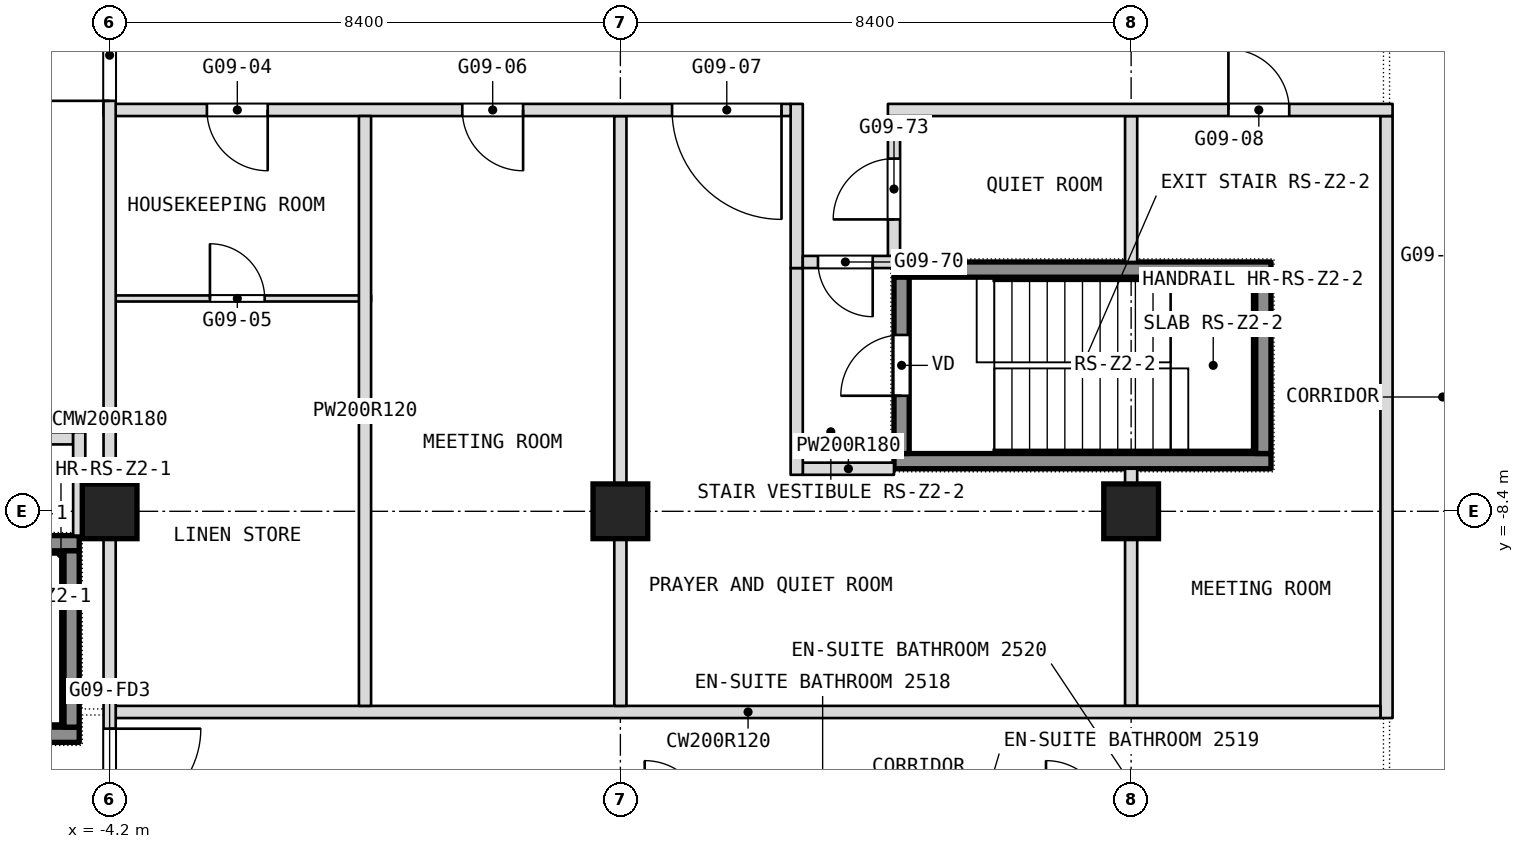
"""IFC4 building model, lengths in metres.
Left out: names, types, materials, properties, quantities, classifications, styles, units other than length and angle.
Written with IfcOpenShell. Run it as: python <this file> out.ifc"""

import sys

from ifc_helpers import new_model, si_unit, direction, frame, frame_2d, origin, origin_2d, place, context, subcontext, project, spatial, rectangle, extrude, element, fill, save


model = new_model("IFC4")
c1 = context("Model", 3, precision=1e-05, world=origin(), true_north=direction((0.0, 1.0)))
c2 = subcontext(c1, "Body", "Model", "MODEL_VIEW")
j1 = project(units=[si_unit("LENGTHUNIT", "METRE"), si_unit("PLANEANGLEUNIT", "RADIAN")], contexts=[c1])
p1 = place(None, origin())
s1 = spatial("IfcSite", under=j1, at=p1, CompositionType="ELEMENT")
p2 = place(p1, origin())
s2 = spatial("IfcBuilding", under=s1, at=p2, CompositionType="ELEMENT")
p3 = place(p2, frame((0.0, 0.0, 115.7)))
s3 = spatial("IfcBuildingStorey", under=s2, at=p3, CompositionType="ELEMENT", Elevation=115.7)
for number, where, z_axis, x_axis in (
    (1, (-4.2, -8.4, 0.0), (0.0, 0.0, 1.0), (1.0, 0.0, 0.0)),
    (2, (4.2, -8.4, 0.0), (0.0, 0.0, 1.0), (1.0, 0.0, 0.0)),
    (3, (12.6, -8.4, 0.0), (0.0, 0.0, 1.0), (1.0, 0.0, 0.0)),
):
    element("IfcColumn", number, at=place(p3, frame(where, z_axis=z_axis, x_axis=x_axis)), inside=s3, PredefinedType="COLUMN", context=c2, shape_type="SweptSolid", body=[
        extrude(rectangle(XDim=0.9, YDim=0.9, at=origin_2d()), origin(), (0.0, 0.0, 1.0), 3.6),
    ])
p4 = place(p3, frame((16.8, -11.8, 0.0), z_axis=(0.0, 0.0, 1.0), x_axis=(0.0, 1.0, 0.0)))
e4 = element("IfcWall", 4, at=p4, inside=s3, PredefinedType="PARTITIONING", context=c2, shape_type="SweptSolid", body=[
    extrude(rectangle(XDim=9.9, YDim=0.2, at=frame_2d((4.95, 0.0))), origin(), (0.0, 0.0, 1.0), 3.34),
])
p5 = place(p3, frame((12.6, -11.6, 0.0), z_axis=(0.0, 0.0, 1.0), x_axis=(0.0, 1.0, 0.0)))
e5 = element("IfcWall", 5, at=p5, inside=s3, PredefinedType="PARTITIONING", context=c2, shape_type="SweptSolid", body=[
    extrude(rectangle(XDim=3.9, YDim=0.2, at=frame_2d((1.95, 0.0))), origin(), (0.0, 0.0, 1.0), 3.34),
])
p6 = place(p3, frame((12.6, -4.3, 0.0), z_axis=(0.0, 0.0, 1.0), x_axis=(0.0, 1.0, 0.0)))
e6 = element("IfcWall", 6, at=p6, inside=s3, PredefinedType="PARTITIONING", context=c2, shape_type="SweptSolid", body=[
    extrude(rectangle(XDim=2.4, YDim=0.2, at=frame_2d((1.2, 0.0))), origin(), (0.0, 0.0, 1.0), 3.34),
])
p7 = place(p3, frame((-4.1, -11.7, 0.0), z_axis=(0.0, 0.0, 1.0), x_axis=(1.0, 0.0, 0.0)))
e7 = element("IfcWall", 7, at=p7, inside=s3, PredefinedType="PARTITIONING", context=c2, shape_type="SweptSolid", body=[
    extrude(rectangle(XDim=20.8, YDim=0.2, at=frame_2d((10.4, 0.0))), origin(), (0.0, 0.0, 1.0), 3.34),
])
p8 = place(p3, frame((8.7, -4.3, 0.0), z_axis=(0.0, 0.0, 1.0), x_axis=(0.0, 1.0, 0.0)))
e8 = element("IfcWall", 8, at=p8, inside=s3, PredefinedType="PARTITIONING", context=c2, shape_type="SweptSolid", body=[
    extrude(rectangle(XDim=2.4, YDim=0.2, at=frame_2d((1.2, 0.0))), origin(), (0.0, 0.0, 1.0), 3.34),
])
p9 = place(p8, frame((0.7, 0.0, 0.0)))
e9 = element("IfcOpeningElement", 9, at=p9, cuts=e8, PredefinedType="OPENING", context=c2, shape_type="SweptSolid", body=[
    extrude(rectangle(XDim=1.0, YDim=2.1, at=frame_2d((0.5, 1.05))), frame((0.0, 0.1, 0.0), z_axis=(0.0, -1.0, 0.0), x_axis=(1.0, 0.0, 0.0)), (0.0, 0.0, 1.0), 0.2),
])
p10 = place(p3, frame((7.2, -7.7, 0.0), z_axis=(0.0, 0.0, 1.0), x_axis=(1.0, 0.0, 0.0)))
e10 = element("IfcWall", 10, at=p10, inside=s3, PredefinedType="PARTITIONING", context=c2, shape_type="SweptSolid", body=[
    extrude(rectangle(XDim=1.5, YDim=0.2, at=frame_2d((0.75, 0.0))), origin(), (0.0, 0.0, 1.0), 3.34),
])
p11 = place(p3, frame((-8.5, -7.2, 0.0), z_axis=(0.0, 0.0, 1.0), x_axis=(1.0, 0.0, 0.0)))
e11 = element("IfcWall", 11, at=p11, inside=s3, PredefinedType="PARTITIONING", context=c2, shape_type="SweptSolid", body=[
    extrude(rectangle(XDim=3.7, YDim=0.2, at=frame_2d((1.85, 0.0))), origin(), (0.0, 0.0, 1.0), 3.34),
])
p12 = place(p11, frame((0.25, 0.0, 0.0)))
e12 = element("IfcOpeningElement", 12, at=p12, cuts=e11, PredefinedType="OPENING", context=c2, shape_type="SweptSolid", body=[
    extrude(rectangle(XDim=0.9, YDim=2.1, at=frame_2d((0.45, 1.05))), frame((0.0, 0.1, 0.0), z_axis=(0.0, -1.0, 0.0), x_axis=(1.0, 0.0, 0.0)), (0.0, 0.0, 1.0), 0.2),
])
p13 = place(p3, frame((7.1, -7.8, 0.0), z_axis=(0.0, 0.0, 1.0), x_axis=(0.0, 1.0, 0.0)))
e13 = element("IfcWall", 13, at=p13, inside=s3, PredefinedType="PARTITIONING", context=c2, shape_type="SweptSolid", body=[
    extrude(rectangle(XDim=3.4, YDim=0.2, at=frame_2d((1.7, 0.0))), origin(), (0.0, 0.0, 1.0), 3.34),
])
p14 = place(p3, frame((7.1, -4.4, 0.0), z_axis=(0.0, 0.0, 1.0), x_axis=(0.0, 1.0, 0.0)))
e14 = element("IfcWall", 14, at=p14, inside=s3, PredefinedType="PARTITIONING", context=c2, shape_type="SweptSolid", body=[
    extrude(rectangle(XDim=2.7, YDim=0.2, at=frame_2d((1.35, 0.0))), origin(), (0.0, 0.0, 1.0), 3.34),
])
p15 = place(p3, frame((-4.1, -4.9, 0.0), z_axis=(0.0, 0.0, 1.0), x_axis=(1.0, 0.0, 0.0)))
e15 = element("IfcWall", 15, at=p15, inside=s3, PredefinedType="PARTITIONING", context=c2, shape_type="SweptSolid", body=[
    extrude(rectangle(XDim=4.2, YDim=0.1, at=frame_2d((2.1, 0.0))), origin(), (0.0, 0.0, 1.0), 3.34),
])
p16 = place(p15, frame((1.55, 0.0, 0.0)))
e16 = element("IfcOpeningElement", 16, at=p16, cuts=e15, PredefinedType="OPENING", context=c2, shape_type="SweptSolid", body=[
    extrude(rectangle(XDim=0.9, YDim=2.1, at=frame_2d((0.45, 1.05))), frame((0.0, 0.05, 0.0), z_axis=(0.0, -1.0, 0.0), x_axis=(1.0, 0.0, 0.0)), (0.0, 0.0, 1.0), 0.1),
])
p17 = place(p3, frame((7.2, -4.3, 0.0), z_axis=(0.0, 0.0, 1.0), x_axis=(1.0, 0.0, 0.0)))
e17 = element("IfcWall", 17, at=p17, inside=s3, PredefinedType="PARTITIONING", context=c2, shape_type="SweptSolid", body=[
    extrude(rectangle(XDim=1.5, YDim=0.2, at=frame_2d((0.75, 0.0))), origin(), (0.0, 0.0, 1.0), 3.34),
])
p18 = place(p17, frame((0.25, 0.0, 0.0)))
e18 = element("IfcOpeningElement", 18, at=p18, cuts=e17, PredefinedType="OPENING", context=c2, shape_type="SweptSolid", body=[
    extrude(rectangle(XDim=0.9, YDim=2.1, at=frame_2d((0.45, 1.05))), frame((0.0, 0.1, 0.0), z_axis=(0.0, -1.0, 0.0), x_axis=(1.0, 0.0, 0.0)), (0.0, 0.0, 1.0), 0.2),
])
p19 = place(p3, frame((4.2, -11.6, 0.0), z_axis=(0.0, 0.0, 1.0), x_axis=(0.0, 1.0, 0.0)))
e19 = element("IfcWall", 19, at=p19, inside=s3, PredefinedType="PARTITIONING", context=c2, shape_type="SweptSolid", body=[
    extrude(rectangle(XDim=9.7, YDim=0.2, at=frame_2d((4.85, 0.0))), origin(), (0.0, 0.0, 1.0), 3.34),
])
p20 = place(p3, frame((-4.3, -1.8, 0.0), z_axis=(0.0, 0.0, 1.0), x_axis=(1.0, 0.0, 0.0)))
e20 = element("IfcWall", 20, at=p20, inside=s3, PredefinedType="PARTITIONING", context=c2, shape_type="SweptSolid", body=[
    extrude(rectangle(XDim=11.3, YDim=0.2, at=frame_2d((5.65, 0.0))), origin(), (0.0, 0.0, 1.0), 3.34),
])
p21 = place(p20, frame((1.7, 0.0, 0.0)))
e21 = element("IfcOpeningElement", 21, at=p21, cuts=e20, PredefinedType="OPENING", context=c2, shape_type="SweptSolid", body=[
    extrude(rectangle(XDim=1.0, YDim=2.1, at=frame_2d((0.5, 1.05))), frame((0.0, 0.1, 0.0), z_axis=(0.0, -1.0, 0.0), x_axis=(1.0, 0.0, 0.0)), (0.0, 0.0, 1.0), 0.2),
])
p22 = place(p20, frame((5.9, 0.0, 0.0)))
e22 = element("IfcOpeningElement", 22, at=p22, cuts=e20, PredefinedType="OPENING", context=c2, shape_type="SweptSolid", body=[
    extrude(rectangle(XDim=1.0, YDim=2.1, at=frame_2d((0.5, 1.05))), frame((0.0, 0.1, 0.0), z_axis=(0.0, -1.0, 0.0), x_axis=(1.0, 0.0, 0.0)), (0.0, 0.0, 1.0), 0.2),
])
p23 = place(p20, frame((9.35, 0.0, 0.0)))
e23 = element("IfcOpeningElement", 23, at=p23, cuts=e20, PredefinedType="OPENING", context=c2, shape_type="SweptSolid", body=[
    extrude(rectangle(XDim=1.8, YDim=2.1, at=frame_2d((0.9, 1.05))), frame((0.0, 0.1, 0.0), z_axis=(0.0, -1.0, 0.0), x_axis=(1.0, 0.0, 0.0)), (0.0, 0.0, 1.0), 0.2),
])
p24 = place(p3, frame((8.6, -1.8, 0.0), z_axis=(0.0, 0.0, 1.0), x_axis=(1.0, 0.0, 0.0)))
e24 = element("IfcWall", 24, at=p24, inside=s3, PredefinedType="PARTITIONING", context=c2, shape_type="SweptSolid", body=[
    extrude(rectangle(XDim=8.3, YDim=0.2, at=frame_2d((4.15, 0.0))), origin(), (0.0, 0.0, 1.0), 3.34),
])
p25 = place(p24, frame((5.6, 0.0, 0.0)))
e25 = element("IfcOpeningElement", 25, at=p25, cuts=e24, PredefinedType="OPENING", context=c2, shape_type="SweptSolid", body=[
    extrude(rectangle(XDim=1.0, YDim=2.1, at=frame_2d((0.5, 1.05))), frame((0.0, 0.1, 0.0), z_axis=(0.0, -1.0, 0.0), x_axis=(1.0, 0.0, 0.0)), (0.0, 0.0, 1.0), 0.2),
])
p26 = place(p3, frame((0.0, -11.6, 0.0), z_axis=(0.0, 0.0, 1.0), x_axis=(0.0, 1.0, 0.0)))
e26 = element("IfcWall", 26, at=p26, inside=s3, PredefinedType="PARTITIONING", context=c2, shape_type="SweptSolid", body=[
    extrude(rectangle(XDim=9.7, YDim=0.2, at=frame_2d((4.85, 0.0))), origin(), (0.0, 0.0, 1.0), 3.34),
])
p27 = place(p3, frame((-4.2, -13.8, 0.0), z_axis=(0.0, 0.0, 1.0), x_axis=(0.0, 1.0, 0.0)))
e27 = element("IfcWall", 27, at=p27, inside=s3, PredefinedType="PARTITIONING", context=c2, shape_type="SweptSolid", body=[
    extrude(rectangle(XDim=13.8, YDim=0.2, at=frame_2d((6.9, 0.0))), origin(), (0.0, 0.0, 1.0), 3.34),
])
p28 = place(p27, frame((12.15, 0.0, 0.0)))
e28 = element("IfcOpeningElement", 28, at=p28, cuts=e27, PredefinedType="OPENING", context=c2, shape_type="SweptSolid", body=[
    extrude(rectangle(XDim=1.5, YDim=2.1, at=frame_2d((0.75, 1.05))), frame((0.0, 0.1, 0.0), z_axis=(0.0, -1.0, 0.0), x_axis=(1.0, 0.0, 0.0)), (0.0, 0.0, 1.0), 0.2),
])
p29 = place(p27, frame((0.325, 0.0, 0.0)))
e29 = element("IfcOpeningElement", 29, at=p29, cuts=e27, PredefinedType="OPENING", context=c2, shape_type="SweptSolid", body=[
    extrude(rectangle(XDim=1.5, YDim=2.1, at=frame_2d((0.75, 1.05))), frame((0.0, 0.1, 0.0), z_axis=(0.0, -1.0, 0.0), x_axis=(1.0, 0.0, 0.0)), (0.0, 0.0, 1.0), 0.2),
])
p30 = place(p3, frame((-4.7, -8.8, 0.0), z_axis=(0.0, 0.0, 1.0), x_axis=(0.0, 1.0, 0.0)))
e30 = element("IfcWall", 30, at=p30, inside=s3, PredefinedType="PARTITIONING", context=c2, shape_type="SweptSolid", body=[
    extrude(rectangle(XDim=1.7, YDim=0.2, at=frame_2d((0.85, 0.0))), origin(), (0.0, 0.0, 1.0), 3.34),
])
p31 = place(p3, frame((-10.9, -12.075, 0.1), z_axis=(0.0, 0.0, 1.0), x_axis=(1.0, 0.0, 0.0)))
e31 = element("IfcWall", 31, at=p31, inside=s3, PredefinedType="SHEAR", context=c2, shape_type="SweptSolid", body=[
    extrude(rectangle(XDim=6.2, YDim=0.25, at=frame_2d((3.1, 0.0))), origin(), (0.0, 0.0, 1.0), 3.6),
])
p32 = place(p3, frame((-10.9, -8.925, 0.1), z_axis=(0.0, 0.0, 1.0), x_axis=(1.0, 0.0, 0.0)))
e32 = element("IfcWall", 32, at=p32, inside=s3, PredefinedType="SHEAR", context=c2, shape_type="SweptSolid", body=[
    extrude(rectangle(XDim=6.2, YDim=0.25, at=frame_2d((3.1, 0.0))), origin(), (0.0, 0.0, 1.0), 3.6),
])
p33 = place(p32, frame((0.45, 0.0, 0.0)))
e33 = element("IfcOpeningElement", 33, at=p33, cuts=e32, PredefinedType="OPENING", context=c2, shape_type="SweptSolid", body=[
    extrude(rectangle(XDim=1.0, YDim=2.1, at=frame_2d((0.5, 1.05))), frame((0.0, 0.125, 0.0), z_axis=(0.0, -1.0, 0.0), x_axis=(1.0, 0.0, 0.0)), (0.0, 0.0, 1.0), 0.25),
])
p34 = place(p3, frame((-4.825, -11.95, 0.1), z_axis=(0.0, 0.0, 1.0), x_axis=(0.0, 1.0, 0.0)))
e34 = element("IfcWall", 34, at=p34, inside=s3, PredefinedType="SHEAR", context=c2, shape_type="SweptSolid", body=[
    extrude(rectangle(XDim=2.9, YDim=0.25, at=frame_2d((1.45, 0.0))), origin(), (0.0, 0.0, 1.0), 3.6),
])
for number, where, z_axis, x_axis in (
    (35, (8.7, -7.575, 0.1), (0.0, 0.0, 1.0), (1.0, 0.0, 0.0)),
    (36, (8.7, -4.425, 0.1), (0.0, 0.0, 1.0), (1.0, 0.0, 0.0)),
):
    element("IfcWall", number, at=place(p3, frame(where, z_axis=z_axis, x_axis=x_axis)), inside=s3, PredefinedType="SHEAR", context=c2, shape_type="SweptSolid", body=[
        extrude(rectangle(XDim=6.2, YDim=0.25, at=frame_2d((3.1, 0.0))), origin(), (0.0, 0.0, 1.0), 3.6),
    ])
p35 = place(p3, frame((8.825, -7.45, 0.1), z_axis=(0.0, 0.0, 1.0), x_axis=(0.0, 1.0, 0.0)))
e37 = element("IfcWall", 37, at=p35, inside=s3, PredefinedType="SHEAR", context=c2, shape_type="SweptSolid", body=[
    extrude(rectangle(XDim=2.9, YDim=0.25, at=frame_2d((1.45, 0.0))), origin(), (0.0, 0.0, 1.0), 3.6),
])
p36 = place(p35, frame((0.95, 0.0, 0.0)))
e38 = element("IfcOpeningElement", 38, at=p36, cuts=e37, PredefinedType="OPENING", context=c2, shape_type="SweptSolid", body=[
    extrude(rectangle(XDim=1.0, YDim=2.1, at=frame_2d((0.5, 1.05))), frame((0.0, 0.125, 0.0), z_axis=(0.0, -1.0, 0.0), x_axis=(1.0, 0.0, 0.0)), (0.0, 0.0, 1.0), 0.25),
])
p37 = place(p3, frame((14.775, -7.45, 0.1), z_axis=(0.0, 0.0, 1.0), x_axis=(0.0, 1.0, 0.0)))
e39 = element("IfcWall", 39, at=p37, inside=s3, PredefinedType="SHEAR", context=c2, shape_type="SweptSolid", body=[
    extrude(rectangle(XDim=2.9, YDim=0.25, at=frame_2d((1.45, 0.0))), origin(), (0.0, 0.0, 1.0), 3.6),
])
p38 = place(p9, origin())
e40 = element("IfcDoor", 40, at=p38, inside=s3, OperationType="SINGLE_SWING_LEFT", PredefinedType="DOOR", context=c2, shape_type="SweptSolid", body=[
    extrude(rectangle(XDim=1.0, YDim=2.1, at=frame_2d((0.5, 1.05))), frame((0.0, 0.025, 0.0), z_axis=(0.0, -1.0, 0.0), x_axis=(1.0, 0.0, 0.0)), (0.0, 0.0, 1.0), 0.05),
])
fill(e9, e40)
p39 = place(p16, origin())
e41 = element("IfcDoor", 41, at=p39, inside=s3, OperationType="SINGLE_SWING_LEFT", PredefinedType="DOOR", context=c2, shape_type="SweptSolid", body=[
    extrude(rectangle(XDim=0.9, YDim=2.1, at=frame_2d((0.45, 1.05))), frame((0.0, 0.025, 0.0), z_axis=(0.0, -1.0, 0.0), x_axis=(1.0, 0.0, 0.0)), (0.0, 0.0, 1.0), 0.05),
])
fill(e16, e41)
p40 = place(p18, origin())
e42 = element("IfcDoor", 42, at=p40, inside=s3, OperationType="SINGLE_SWING_RIGHT", PredefinedType="DOOR", context=c2, shape_type="SweptSolid", body=[
    extrude(rectangle(XDim=0.9, YDim=2.1, at=frame_2d((0.45, 1.05))), frame((0.0, 0.025, 0.0), z_axis=(0.0, -1.0, 0.0), x_axis=(1.0, 0.0, 0.0)), (0.0, 0.0, 1.0), 0.05),
])
fill(e18, e42)
p41 = place(p21, origin())
e43 = element("IfcDoor", 43, at=p41, inside=s3, OperationType="SINGLE_SWING_RIGHT", PredefinedType="DOOR", context=c2, shape_type="SweptSolid", body=[
    extrude(rectangle(XDim=1.0, YDim=2.1, at=frame_2d((0.5, 1.05))), frame((0.0, 0.025, 0.0), z_axis=(0.0, -1.0, 0.0), x_axis=(1.0, 0.0, 0.0)), (0.0, 0.0, 1.0), 0.05),
])
fill(e21, e43)
p42 = place(p22, origin())
e44 = element("IfcDoor", 44, at=p42, inside=s3, OperationType="SINGLE_SWING_RIGHT", PredefinedType="DOOR", context=c2, shape_type="SweptSolid", body=[
    extrude(rectangle(XDim=1.0, YDim=2.1, at=frame_2d((0.5, 1.05))), frame((0.0, 0.025, 0.0), z_axis=(0.0, -1.0, 0.0), x_axis=(1.0, 0.0, 0.0)), (0.0, 0.0, 1.0), 0.05),
])
fill(e22, e44)
p43 = place(p23, origin())
e45 = element("IfcDoor", 45, at=p43, inside=s3, OperationType="DOUBLE_DOOR_SINGLE_SWING", PredefinedType="DOOR", context=c2, shape_type="SweptSolid", body=[
    extrude(rectangle(XDim=1.8, YDim=2.1, at=frame_2d((0.9, 1.05))), frame((0.0, 0.025, 0.0), z_axis=(0.0, -1.0, 0.0), x_axis=(1.0, 0.0, 0.0)), (0.0, 0.0, 1.0), 0.05),
])
fill(e23, e45)
p44 = place(p25, origin())
e46 = element("IfcDoor", 46, at=p44, inside=s3, OperationType="SINGLE_SWING_RIGHT", PredefinedType="DOOR", context=c2, shape_type="SweptSolid", body=[
    extrude(rectangle(XDim=1.0, YDim=2.1, at=frame_2d((0.5, 1.05))), frame((0.0, 0.025, 0.0), z_axis=(0.0, -1.0, 0.0), x_axis=(1.0, 0.0, 0.0)), (0.0, 0.0, 1.0), 0.05),
])
fill(e25, e46)
p45 = place(p36, origin())
e47 = element("IfcDoor", 47, at=p45, inside=s3, OperationType="SINGLE_SWING_LEFT", PredefinedType="DOOR", context=c2, shape_type="SweptSolid", body=[
    extrude(rectangle(XDim=1.0, YDim=2.1, at=frame_2d((0.5, 1.05))), frame((0.0, 0.025, 0.0), z_axis=(0.0, -1.0, 0.0), x_axis=(1.0, 0.0, 0.0)), (0.0, 0.0, 1.0), 0.05),
])
fill(e38, e47)
p46 = place(p28, origin())
e48 = element("IfcDoor", 48, at=p46, inside=s3, OperationType="DOUBLE_DOOR_DOUBLE_SWING", PredefinedType="DOOR", context=c2, shape_type="SweptSolid", body=[
    extrude(rectangle(XDim=1.5, YDim=2.1, at=frame_2d((0.75, 1.05))), frame((0.0, 0.025, 0.0), z_axis=(0.0, -1.0, 0.0), x_axis=(1.0, 0.0, 0.0)), (0.0, 0.0, 1.0), 0.05),
])
fill(e28, e48)
p47 = place(p29, origin())
e49 = element("IfcDoor", 49, at=p47, inside=s3, OperationType="DOUBLE_DOOR_DOUBLE_SWING", PredefinedType="DOOR", context=c2, shape_type="SweptSolid", body=[
    extrude(rectangle(XDim=1.5, YDim=2.1, at=frame_2d((0.75, 1.05))), frame((0.0, 0.025, 0.0), z_axis=(0.0, -1.0, 0.0), x_axis=(1.0, 0.0, 0.0)), (0.0, 0.0, 1.0), 0.05),
])
fill(e29, e49)
save(model, sys.argv[1])
